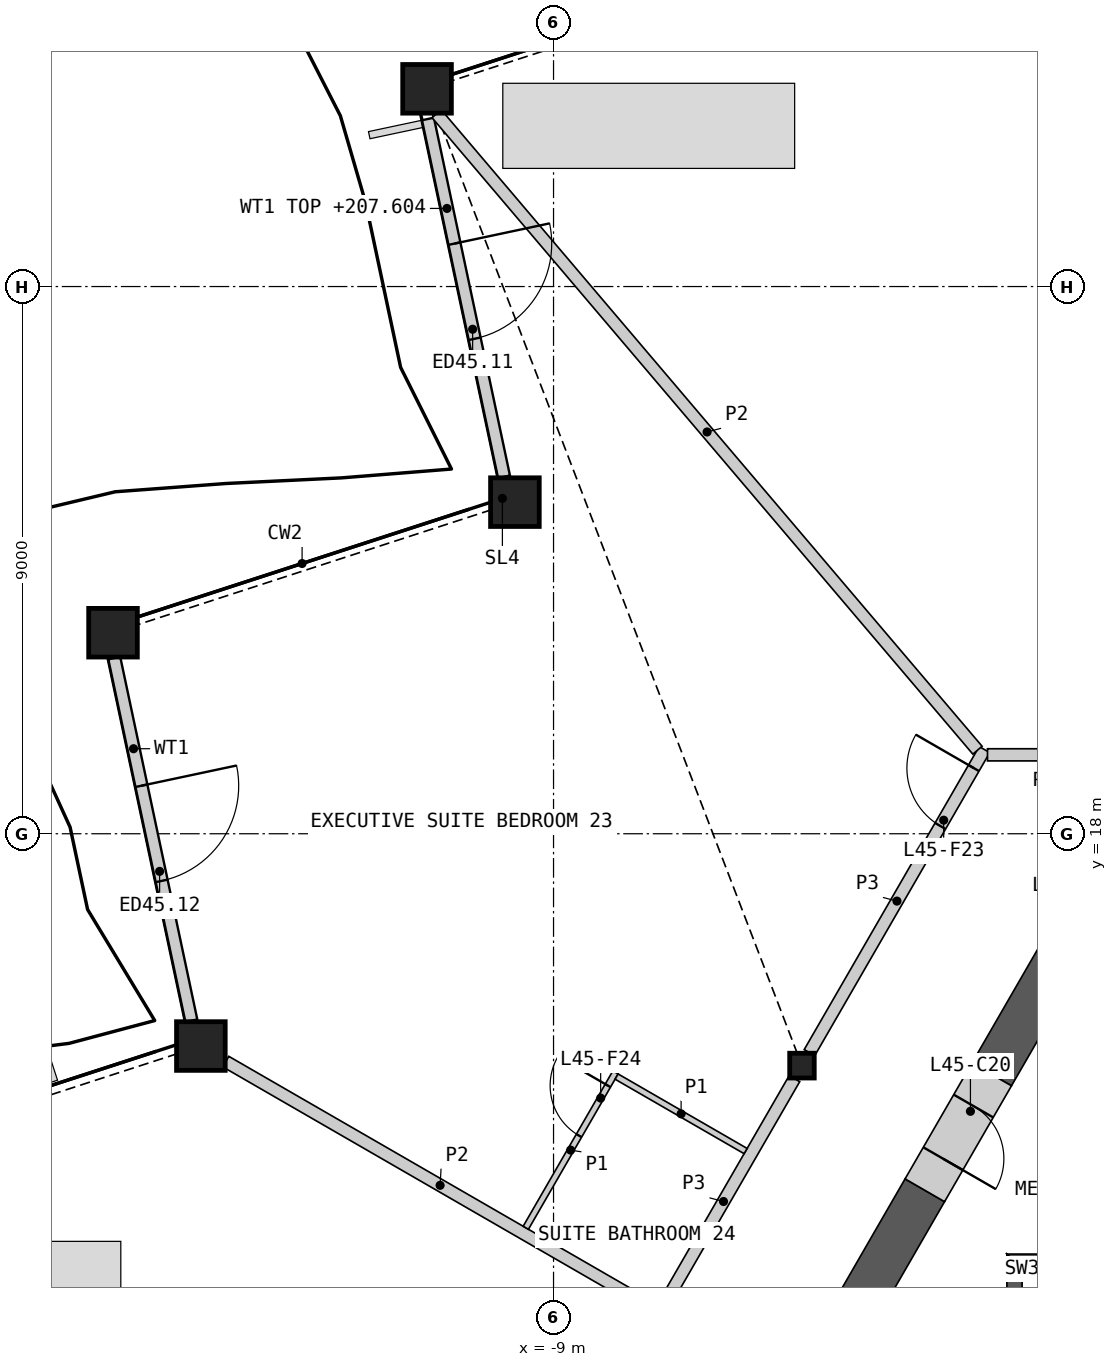
"""IFC4 building model, lengths in metres.
Left out: names, types, materials, properties, quantities, classifications, styles, units other than length and angle.
Written with IfcOpenShell. Run it as: python <this file> out.ifc"""

import sys

from ifc_helpers import new_model, si_unit, direction, frame, frame_2d, origin, origin_2d, place, context, subcontext, project, spatial, polyline, rectangle, hollow_rectangle, i_section, outline, extrude, element, fill, save


model = new_model("IFC4")
c1 = context("Model", 3, precision=1e-05, world=origin(), true_north=direction((0.0, 1.0)))
c2 = subcontext(c1, "Body", "Model", "MODEL_VIEW")
j1 = project(units=[si_unit("LENGTHUNIT", "METRE"), si_unit("PLANEANGLEUNIT", "RADIAN")], contexts=[c1])
p1 = place(None, origin())
s1 = spatial("IfcSite", under=j1, at=p1, CompositionType="ELEMENT")
p2 = place(p1, origin())
s2 = spatial("IfcBuilding", under=s1, at=p2, CompositionType="ELEMENT")
p3 = place(p2, frame((0.0, 0.0, 205.2)))
s3 = spatial("IfcBuildingStorey", under=s2, at=p3, CompositionType="ELEMENT", Elevation=205.2)
for number, where, z_axis, x_axis in (
    (1, (-11.08, 30.252, 0.0), (0.0, 0.0, 1.0), (1.0, 0.0, 0.0)),
    (2, (-9.635, 23.454, 0.0), (0.0, 0.0, 1.0), (1.0, 0.0, 0.0)),
    (3, (-16.245, 21.306, 0.0), (0.0, 0.0, 1.0), (1.0, 0.0, 0.0)),
    (4, (-14.8, 14.508, 0.0), (0.0, 0.0, 1.0), (1.0, 0.0, 0.0)),
):
    element("IfcColumn", number, at=place(p3, frame(where, z_axis=z_axis, x_axis=x_axis)), inside=s3, PredefinedType="COLUMN", context=c2, shape_type="SweptSolid", body=[
        extrude(hollow_rectangle(XDim=0.8, YDim=0.8, WallThickness=0.05, at=origin_2d()), origin(), (0.0, 0.0, 1.0), 3.6),
    ])
p4 = place(p3, frame((-4.914, 14.186, 0.0), z_axis=(0.0, 0.0, 1.0), x_axis=(1.0, 0.0, 0.0)))
e5 = element("IfcColumn", 5, at=p4, inside=s3, PredefinedType="COLUMN", context=c2, shape_type="SweptSolid", body=[
    extrude(i_section(OverallWidth=0.404, OverallDepth=0.407, WebThickness=0.027, FlangeThickness=0.044, at=origin_2d()), origin(), (0.0, 0.0, 1.0), 3.6),
])
p5 = place(p3, frame((-11.065, 29.756, 0.0), z_axis=(0.0, 0.0, 1.0), x_axis=(0.207907768613, -0.978148434416, 0.0)))
e6 = element("IfcWall", 6, at=p5, inside=s3, PredefinedType="SOLIDWALL", context=c2, shape_type="SweptSolid", body=[
    extrude(rectangle(XDim=6.017, YDim=0.2, at=frame_2d((3.009, 0.0))), origin(), (0.0, 0.0, 1.0), 2.404),
])
p6 = place(p5, frame((2.096, 0.0, 0.0)))
e7 = element("IfcOpeningElement", 7, at=p6, cuts=e6, PredefinedType="OPENING", context=c2, shape_type="SweptSolid", body=[
    extrude(rectangle(XDim=1.6, YDim=2.4, at=frame_2d((0.8, 1.2))), frame((0.0, 0.11, 0.0), z_axis=(0.0, -1.0, 0.0), x_axis=(1.0, 0.0, 0.0)), (0.0, 0.0, 1.0), 0.22),
])
p7 = place(p3, frame((-16.224, 20.89, 0.0), z_axis=(0.0, 0.0, 1.0), x_axis=(0.207912864597, -0.978147351238, 0.0)))
e8 = element("IfcWall", 8, at=p7, inside=s3, PredefinedType="SOLIDWALL", context=c2, shape_type="SweptSolid", body=[
    extrude(rectangle(XDim=6.098, YDim=0.2, at=frame_2d((3.049, 0.0))), origin(), (0.0, 0.0, 1.0), 2.701),
])
p8 = place(p7, frame((2.147, 0.0, 0.0)))
e9 = element("IfcOpeningElement", 9, at=p8, cuts=e8, PredefinedType="OPENING", context=c2, shape_type="SweptSolid", body=[
    extrude(rectangle(XDim=1.6, YDim=2.4, at=frame_2d((0.8, 1.2))), frame((0.0, 0.11, 0.0), z_axis=(0.0, -1.0, 0.0), x_axis=(1.0, 0.0, 0.0)), (0.0, 0.0, 1.0), 0.22),
])
p9 = place(p3, origin())
e10 = element("IfcWall", 10, at=p9, inside=s3, PredefinedType="SHEAR", context=c2, shape_type="SweptSolid", body=[
    extrude(outline(polyline([(1.544, 11.087), (-1.544, 11.087), (-1.294, 10.837), (1.294, 10.837), (1.544, 11.087)])), origin(), (0.0, 0.0, 1.0), 3.25),
])
p10 = place(p3, origin())
e11 = element("IfcWall", 11, at=p10, inside=s3, PredefinedType="SHEAR", context=c2, shape_type="SweptSolid", body=[
    extrude(outline(polyline([(-1.294, 10.837), (-1.544, 11.087), (-1.544, 5.237), (-1.294, 5.237), (-1.294, 10.837)])), origin(), (0.0, 0.0, 1.0), 3.25),
])
p11 = place(p3, frame((-2.894, 12.136, 0.0), z_axis=(0.0, 0.0, 1.0), x_axis=(-0.500021737671, -0.866012853171, 0.0)))
e12 = element("IfcWall", 12, at=p11, inside=s3, PredefinedType="SHEAR", context=c2, shape_type="SweptSolid", body=[
    extrude(rectangle(XDim=6.026, YDim=0.75, at=frame_2d((3.013, 0.0))), origin(), (0.0, 0.0, 1.0), 3.25),
])
p12 = place(p3, frame((-0.325, 16.585, 0.0), z_axis=(0.0, 0.0, 1.0), x_axis=(-0.500026977578, -0.866009827712, 0.0)))
e13 = element("IfcWall", 13, at=p12, inside=s3, PredefinedType="SHEAR", context=c2, shape_type="SweptSolid", body=[
    extrude(rectangle(XDim=2.938, YDim=0.75, at=frame_2d((1.469, 0.0))), origin(), (0.0, 0.0, 1.0), 3.25),
])
p13 = place(p3, frame((-1.794, 14.041, 0.0), z_axis=(0.0, 0.0, 1.0), x_axis=(-0.499946605688, -0.86605622881, 0.0)))
e14 = element("IfcWall", 14, at=p13, inside=s3, PredefinedType="SHEAR", context=c2, shape_type="SweptSolid", body=[
    extrude(rectangle(XDim=2.2, YDim=0.75, at=frame_2d((1.1, 0.0))), origin(), (0.0, 0.0, 1.0), 3.25),
])
p14 = place(p13, frame((0.6, 0.0, 0.0)))
e15 = element("IfcOpeningElement", 15, at=p14, cuts=e14, PredefinedType="OPENING", context=c2, shape_type="SweptSolid", body=[
    extrude(rectangle(XDim=1.0, YDim=2.1, at=frame_2d((0.5, 1.05))), frame((0.0, 0.385, 0.0), z_axis=(0.0, -1.0, 0.0), x_axis=(1.0, 0.0, 0.0)), (0.0, 0.0, 1.0), 0.77),
])
p15 = place(p3, frame((-9.705, 5.888, 0.0), z_axis=(0.0, 0.0, 1.0), x_axis=(0.50000393355, 0.866023132736, 0.0)))
e16 = element("IfcWall", 16, at=p15, inside=s3, PredefinedType="PARTITIONING", context=c2, shape_type="SweptSolid", body=[
    extrude(rectangle(XDim=9.335, YDim=0.2, at=frame_2d((4.667, 0.0))), origin(), (0.0, 0.0, 1.0), 3.25),
])
p16 = place(p15, frame((1.556, 0.0, 0.0)))
e17 = element("IfcOpeningElement", 17, at=p16, cuts=e16, PredefinedType="OPENING", context=c2, shape_type="SweptSolid", body=[
    extrude(rectangle(XDim=1.8, YDim=2.1, at=frame_2d((0.9, 1.05))), frame((0.0, 0.11, 0.0), z_axis=(0.0, -1.0, 0.0), x_axis=(1.0, 0.0, 0.0)), (0.0, 0.0, 1.0), 0.22),
])
p17 = place(p3, frame((-4.791, 14.4, 0.0), z_axis=(0.0, 0.0, 1.0), x_axis=(0.50000762079, 0.866021003874, 0.0)))
e18 = element("IfcWall", 18, at=p17, inside=s3, PredefinedType="PARTITIONING", context=c2, shape_type="SweptSolid", body=[
    extrude(rectangle(XDim=5.756, YDim=0.2, at=frame_2d((2.878, 0.0))), origin(), (0.0, 0.0, 1.0), 3.25),
])
p18 = place(p17, frame((4.304, 0.0, 0.0)))
e19 = element("IfcOpeningElement", 19, at=p18, cuts=e18, PredefinedType="OPENING", context=c2, shape_type="SweptSolid", body=[
    extrude(rectangle(XDim=1.1, YDim=2.1, at=frame_2d((0.55, 1.05))), frame((0.0, 0.11, 0.0), z_axis=(0.0, -1.0, 0.0), x_axis=(1.0, 0.0, 0.0)), (0.0, 0.0, 1.0), 0.22),
])
p19 = place(p3, frame((-1.863, 19.298, 0.0), z_axis=(0.0, 0.0, 1.0), x_axis=(1.0, 0.0, 0.0)))
e20 = element("IfcWall", 20, at=p19, inside=s3, PredefinedType="PARTITIONING", context=c2, shape_type="SweptSolid", body=[
    extrude(rectangle(XDim=3.726, YDim=0.2, at=frame_2d((1.863, 0.0))), origin(), (0.0, 0.0, 1.0), 3.25),
])
p20 = place(p19, frame((0.963, 0.0, 0.0)))
e21 = element("IfcOpeningElement", 21, at=p20, cuts=e20, PredefinedType="OPENING", context=c2, shape_type="SweptSolid", body=[
    extrude(rectangle(XDim=1.8, YDim=2.1, at=frame_2d((0.9, 1.05))), frame((0.0, 0.11, 0.0), z_axis=(0.0, -1.0, 0.0), x_axis=(1.0, 0.0, 0.0)), (0.0, 0.0, 1.0), 0.22),
])
p21 = place(p3, frame((-10.922, 29.842, 0.0), z_axis=(0.0, 0.0, 1.0), x_axis=(0.647497756192, -0.762067356423, 0.0)))
e22 = element("IfcWall", 22, at=p21, inside=s3, PredefinedType="PARTITIONING", context=c2, shape_type="SweptSolid", body=[
    extrude(rectangle(XDim=13.736, YDim=0.2, at=frame_2d((6.868, 0.0))), origin(), (0.0, 0.0, 1.0), 2.404),
])
p22 = place(p3, frame((-14.39, 14.252, 0.0), z_axis=(0.0, 0.0, 1.0), x_axis=(0.866028741424, -0.499994218994, 0.0)))
e23 = element("IfcWall", 23, at=p22, inside=s3, PredefinedType="PARTITIONING", context=c2, shape_type="SweptSolid", body=[
    extrude(rectangle(XDim=8.139, YDim=0.2, at=frame_2d((4.07, 0.0))), origin(), (0.0, 0.0, 1.0), 2.404),
])
p23 = place(p3, frame((-9.456, 11.519, 0.0), z_axis=(0.0, 0.0, 1.0), x_axis=(0.499939757307, 0.866060182126, 0.0)))
e24 = element("IfcWall", 24, at=p23, inside=s3, PredefinedType="PARTITIONING", context=c2, shape_type="SweptSolid", body=[
    extrude(rectangle(XDim=2.95, YDim=0.1, at=frame_2d((1.475, 0.0))), origin(), (0.0, 0.0, 1.0), 2.404),
])
p24 = place(p23, frame((1.75, 0.0, 0.0)))
e25 = element("IfcOpeningElement", 25, at=p24, cuts=e24, PredefinedType="OPENING", context=c2, shape_type="SweptSolid", body=[
    extrude(rectangle(XDim=0.95, YDim=2.1, at=frame_2d((0.475, 1.05))), frame((0.0, 0.06, 0.0), z_axis=(0.0, -1.0, 0.0), x_axis=(1.0, 0.0, 0.0)), (0.0, 0.0, 1.0), 0.12),
])
p25 = place(p3, frame((-7.963, 14.006, 0.0), z_axis=(0.0, 0.0, 1.0), x_axis=(0.866057815567, -0.499943856944, 0.0)))
e26 = element("IfcWall", 26, at=p25, inside=s3, PredefinedType="PARTITIONING", context=c2, shape_type="SweptSolid", body=[
    extrude(rectangle(XDim=2.45, YDim=0.1, at=frame_2d((1.225, 0.0))), origin(), (0.0, 0.0, 1.0), 2.404),
])
p26 = place(p6, origin())
e27 = element("IfcDoor", 27, at=p26, inside=s3, OperationType="DOUBLE_DOOR_SINGLE_SWING", PredefinedType="DOOR", context=c2, shape_type="SweptSolid", body=[
    extrude(rectangle(XDim=1.6, YDim=2.4, at=frame_2d((0.8, 1.2))), frame((0.0, 0.025, 0.0), z_axis=(0.0, -1.0, 0.0), x_axis=(1.0, 0.0, 0.0)), (0.0, 0.0, 1.0), 0.05),
])
fill(e7, e27)
p27 = place(p8, origin())
e28 = element("IfcDoor", 28, at=p27, inside=s3, OperationType="DOUBLE_DOOR_SINGLE_SWING", PredefinedType="DOOR", context=c2, shape_type="SweptSolid", body=[
    extrude(rectangle(XDim=1.6, YDim=2.4, at=frame_2d((0.8, 1.2))), frame((0.0, 0.025, 0.0), z_axis=(0.0, -1.0, 0.0), x_axis=(1.0, 0.0, 0.0)), (0.0, 0.0, 1.0), 0.05),
])
fill(e9, e28)
p28 = place(p14, origin())
e29 = element("IfcDoor", 29, at=p28, inside=s3, OperationType="SINGLE_SWING_RIGHT", PredefinedType="DOOR", context=c2, shape_type="SweptSolid", body=[
    extrude(rectangle(XDim=1.0, YDim=2.1, at=frame_2d((0.5, 1.05))), frame((0.0, 0.13, 0.0), z_axis=(0.0, -1.0, 0.0), x_axis=(1.0, 0.0, 0.0)), (0.0, 0.0, 1.0), 0.05),
])
fill(e15, e29)
p29 = place(p18, origin())
e30 = element("IfcDoor", 30, at=p29, inside=s3, OperationType="SINGLE_SWING_RIGHT", PredefinedType="DOOR", context=c2, shape_type="SweptSolid", body=[
    extrude(rectangle(XDim=1.1, YDim=2.1, at=frame_2d((0.55, 1.05))), frame((0.0, 0.025, 0.0), z_axis=(0.0, -1.0, 0.0), x_axis=(1.0, 0.0, 0.0)), (0.0, 0.0, 1.0), 0.05),
])
fill(e19, e30)
p30 = place(p24, origin())
e31 = element("IfcDoor", 31, at=p30, inside=s3, OperationType="SINGLE_SWING_RIGHT", PredefinedType="DOOR", context=c2, shape_type="SweptSolid", body=[
    extrude(rectangle(XDim=0.95, YDim=2.1, at=frame_2d((0.475, 1.05))), frame((0.0, 0.025, 0.0), z_axis=(0.0, -1.0, 0.0), x_axis=(1.0, 0.0, 0.0)), (0.0, 0.0, 1.0), 0.05),
])
fill(e25, e31)
save(model, sys.argv[1])
